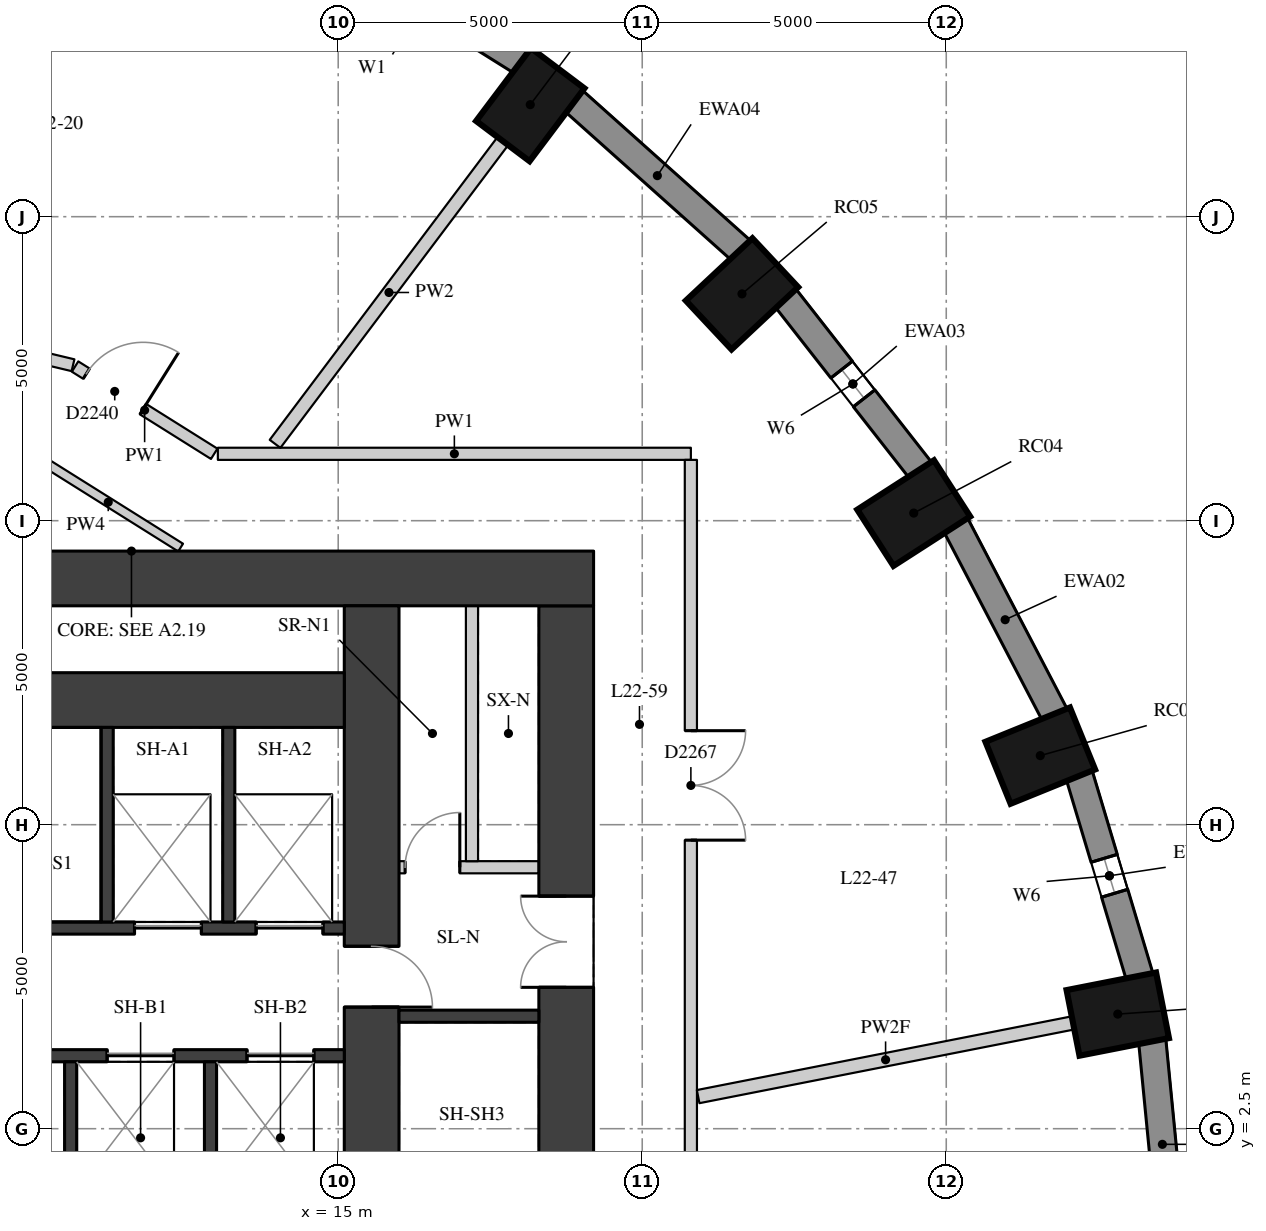
"""IFC4 building model, lengths in metres.
Left out: names, types, materials, properties, quantities, classifications, styles, units other than length and angle.
Written with IfcOpenShell. Run it as: python <this file> out.ifc"""

import sys

from ifc_helpers import new_model, si_unit, direction, frame, frame_2d, origin, origin_2d, place, context, subcontext, project, spatial, rectangle, extrude, element, fill, save


model = new_model("IFC4")
c1 = context("Model", 3, precision=1e-05, world=origin(), true_north=direction((0.0, 1.0)))
c2 = subcontext(c1, "Body", "Model", "MODEL_VIEW")
j1 = project(units=[si_unit("LENGTHUNIT", "METRE"), si_unit("PLANEANGLEUNIT", "RADIAN")], contexts=[c1])
p1 = place(None, origin())
s1 = spatial("IfcSite", under=j1, at=p1, CompositionType="ELEMENT")
p2 = place(p1, origin())
s2 = spatial("IfcBuilding", under=s1, at=p2, CompositionType="ELEMENT")
p3 = place(p2, frame((0.0, 0.0, 81.1)))
s3 = spatial("IfcBuildingStorey", under=s2, at=p3, CompositionType="ELEMENT", Elevation=81.1)
for number, where, z_axis, x_axis in (
    (1, (27.821, 4.385, 0.0), (0.0, 0.0, 1.0), (0.981, 0.193, 0.0)),
    (2, (26.546, 8.636, 0.0), (0.0, 0.0, 1.0), (0.927, 0.376, 0.0)),
    (3, (24.465, 12.625, 0.0), (0.0, 0.0, 1.0), (0.841, 0.541, 0.0)),
    (4, (21.641, 16.23, 0.0), (0.0, 0.0, 1.0), (0.73, 0.683, 0.0)),
    (5, (18.159, 19.343, 0.0), (0.0, 0.0, 1.0), (0.601, 0.799, 0.0)),
):
    element("IfcColumn", number, at=place(p3, frame(where, z_axis=z_axis, x_axis=x_axis)), inside=s3, PredefinedType="COLUMN", context=c2, shape_type="SweptSolid", body=[
        extrude(rectangle(XDim=1.5, YDim=1.1, at=origin_2d()), origin(), (0.0, 0.0, 1.0), 3.3),
    ])
p4 = place(p3, frame((28.722, 0.53, 0.0), z_axis=(0.0, 0.0, 1.0), x_axis=(-0.097389581596, 0.995246336038, 0.0)))
e6 = element("IfcWall", 6, at=p4, inside=s3, PredefinedType="SOLIDWALL", context=c2, shape_type="SweptSolid", body=[
    extrude(rectangle(XDim=3.442, YDim=0.45, at=frame_2d((1.721, 0.0))), origin(), (0.0, 0.0, 1.0), 2.85),
])
p5 = place(p3, frame((28.182, 4.996, 0.0), z_axis=(0.0, 0.0, 1.0), x_axis=(-0.287064133733, 0.957911364963, 0.0)))
e7 = element("IfcWall", 7, at=p5, inside=s3, PredefinedType="SOLIDWALL", context=c2, shape_type="SweptSolid", body=[
    extrude(rectangle(XDim=3.473, YDim=0.45, at=frame_2d((1.737, 0.0))), origin(), (0.0, 0.0, 1.0), 2.85),
])
p6 = place(p5, frame((1.437, 0.0, 0.4)))
e8 = element("IfcOpeningElement", 8, at=p6, cuts=e7, PredefinedType="OPENING", context=c2, shape_type="SweptSolid", body=[
    extrude(rectangle(XDim=0.6, YDim=1.75, at=frame_2d((0.3, 0.875))), frame((0.0, 0.235, 0.0), z_axis=(0.0, -1.0, 0.0), x_axis=(1.0, 0.0, 0.0)), (0.0, 0.0, 1.0), 0.47),
])
p7 = place(p3, frame((26.786, 9.305, 0.0), z_axis=(0.0, 0.0, 1.0), x_axis=(-0.462492775226, 0.886623050041, 0.0)))
e9 = element("IfcWall", 9, at=p7, inside=s3, PredefinedType="SOLIDWALL", context=c2, shape_type="SweptSolid", body=[
    extrude(rectangle(XDim=3.532, YDim=0.45, at=frame_2d((1.766, 0.0))), origin(), (0.0, 0.0, 1.0), 2.85),
])
p8 = place(p3, frame((24.578, 13.328, 0.0), z_axis=(0.0, 0.0, 1.0), x_axis=(-0.616661975264, 0.787228053529, 0.0)))
e10 = element("IfcWall", 10, at=p8, inside=s3, PredefinedType="SOLIDWALL", context=c2, shape_type="SweptSolid", body=[
    extrude(rectangle(XDim=3.61, YDim=0.45, at=frame_2d((1.805, 0.0))), origin(), (0.0, 0.0, 1.0), 2.85),
])
p9 = place(p8, frame((1.505, 0.0, 0.4)))
e11 = element("IfcOpeningElement", 11, at=p9, cuts=e10, PredefinedType="OPENING", context=c2, shape_type="SweptSolid", body=[
    extrude(rectangle(XDim=0.6, YDim=1.75, at=frame_2d((0.3, 0.875))), frame((0.0, 0.235, 0.0), z_axis=(0.0, -1.0, 0.0), x_axis=(1.0, 0.0, 0.0)), (0.0, 0.0, 1.0), 0.47),
])
p10 = place(p3, frame((21.627, 16.943, 0.0), z_axis=(0.0, 0.0, 1.0), x_axis=(-0.745526233716, 0.66647628228, 0.0)))
e12 = element("IfcWall", 12, at=p10, inside=s3, PredefinedType="SOLIDWALL", context=c2, shape_type="SweptSolid", body=[
    extrude(rectangle(XDim=3.697, YDim=0.45, at=frame_2d((1.848, 0.0))), origin(), (0.0, 0.0, 1.0), 2.85),
])
p11 = place(p3, frame((18.023, 20.044, 0.0), z_axis=(0.0, 0.0, 1.0), x_axis=(-0.847635480093, 0.530579016629, 0.0)))
e13 = element("IfcWall", 13, at=p11, inside=s3, PredefinedType="SOLIDWALL", context=c2, shape_type="SweptSolid", body=[
    extrude(rectangle(XDim=3.782, YDim=0.45, at=frame_2d((1.891, 0.0))), origin(), (0.0, 0.0, 1.0), 2.85),
])
p12 = place(p11, frame((0.791, 0.0, 0.4)))
e14 = element("IfcOpeningElement", 14, at=p12, cuts=e13, PredefinedType="OPENING", context=c2, shape_type="SweptSolid", body=[
    extrude(rectangle(XDim=2.2, YDim=1.75, at=frame_2d((1.1, 0.875))), frame((0.0, 0.235, 0.0), z_axis=(0.0, -1.0, 0.0), x_axis=(1.0, 0.0, 0.0)), (0.0, 0.0, 1.0), 0.47),
])
p13 = place(p3, frame((18.75, -11.1, 0.0), z_axis=(0.0, 0.0, 1.0), x_axis=(0.0, 1.0, 0.0)))
e15 = element("IfcWall", 15, at=p13, inside=s3, PredefinedType="SHEAR", context=c2, shape_type="SweptSolid", body=[
    extrude(rectangle(XDim=22.2, YDim=0.9, at=frame_2d((11.1, 0.0))), origin(), (0.0, 0.0, 1.0), 2.85),
])
p14 = place(p13, frame((15.925, 0.0, 0.0)))
e16 = element("IfcOpeningElement", 16, at=p14, cuts=e15, PredefinedType="OPENING", context=c2, shape_type="SweptSolid", body=[
    extrude(rectangle(XDim=1.5, YDim=2.1, at=frame_2d((0.75, 1.05))), frame((0.0, 0.46, 0.0), z_axis=(0.0, -1.0, 0.0), x_axis=(1.0, 0.0, 0.0)), (0.0, 0.0, 1.0), 0.92),
])
p15 = place(p13, frame((4.525, 0.0, 0.0)))
e17 = element("IfcOpeningElement", 17, at=p15, cuts=e15, PredefinedType="OPENING", context=c2, shape_type="SweptSolid", body=[
    extrude(rectangle(XDim=1.5, YDim=2.1, at=frame_2d((0.75, 1.05))), frame((0.0, 0.46, 0.0), z_axis=(0.0, -1.0, 0.0), x_axis=(1.0, 0.0, 0.0)), (0.0, 0.0, 1.0), 0.92),
])
p16 = place(p3, frame((4.0, 11.55, 0.0), z_axis=(0.0, 0.0, 1.0), x_axis=(1.0, 0.0, 0.0)))
e18 = element("IfcWall", 18, at=p16, inside=s3, PredefinedType="SHEAR", context=c2, shape_type="SweptSolid", body=[
    extrude(rectangle(XDim=15.2, YDim=0.9, at=frame_2d((7.6, 0.0))), origin(), (0.0, 0.0, 1.0), 2.85),
])
p17 = place(p3, frame((15.55, -11.1, 0.0), z_axis=(0.0, 0.0, 1.0), x_axis=(0.0, 1.0, 0.0)))
e19 = element("IfcWall", 19, at=p17, inside=s3, PredefinedType="SHEAR", context=c2, shape_type="SweptSolid", body=[
    extrude(rectangle(XDim=22.2, YDim=0.9, at=frame_2d((11.1, 0.0))), origin(), (0.0, 0.0, 1.0), 2.85),
])
p18 = place(p17, frame((15.6, 0.0, 0.0)))
e20 = element("IfcOpeningElement", 20, at=p18, cuts=e19, PredefinedType="OPENING", context=c2, shape_type="SweptSolid", body=[
    extrude(rectangle(XDim=1.0, YDim=2.1, at=frame_2d((0.5, 1.05))), frame((0.0, 0.46, 0.0), z_axis=(0.0, -1.0, 0.0), x_axis=(1.0, 0.0, 0.0)), (0.0, 0.0, 1.0), 0.92),
])
p19 = place(p17, frame((5.6, 0.0, 0.0)))
e21 = element("IfcOpeningElement", 21, at=p19, cuts=e19, PredefinedType="OPENING", context=c2, shape_type="SweptSolid", body=[
    extrude(rectangle(XDim=1.0, YDim=2.1, at=frame_2d((0.5, 1.05))), frame((0.0, 0.46, 0.0), z_axis=(0.0, -1.0, 0.0), x_axis=(1.0, 0.0, 0.0)), (0.0, 0.0, 1.0), 0.92),
])
p20 = place(p3, frame((4.9, 9.55, 0.0), z_axis=(0.0, 0.0, 1.0), x_axis=(1.0, 0.0, 0.0)))
e22 = element("IfcWall", 22, at=p20, inside=s3, PredefinedType="SHEAR", context=c2, shape_type="SweptSolid", body=[
    extrude(rectangle(XDim=10.2, YDim=0.9, at=frame_2d((5.1, 0.0))), origin(), (0.0, 0.0, 1.0), 2.85),
])
p21 = place(p3, frame((4.9, 5.8, 0.0), z_axis=(0.0, 0.0, 1.0), x_axis=(1.0, 0.0, 0.0)))
e23 = element("IfcWall", 23, at=p21, inside=s3, PredefinedType="SHEAR", context=c2, shape_type="SweptSolid", body=[
    extrude(rectangle(XDim=10.2, YDim=0.2, at=frame_2d((5.1, 0.0))), origin(), (0.0, 0.0, 1.0), 2.85),
])
p22 = place(p21, frame((6.75, 0.0, 0.0)))
e24 = element("IfcOpeningElement", 24, at=p22, cuts=e23, PredefinedType="OPENING", context=c2, shape_type="SweptSolid", body=[
    extrude(rectangle(XDim=1.1, YDim=2.1, at=frame_2d((0.55, 1.05))), frame((0.0, 0.11, 0.0), z_axis=(0.0, -1.0, 0.0), x_axis=(1.0, 0.0, 0.0)), (0.0, 0.0, 1.0), 0.22),
])
p23 = place(p21, frame((8.75, 0.0, 0.0)))
e25 = element("IfcOpeningElement", 25, at=p23, cuts=e23, PredefinedType="OPENING", context=c2, shape_type="SweptSolid", body=[
    extrude(rectangle(XDim=1.1, YDim=2.1, at=frame_2d((0.55, 1.05))), frame((0.0, 0.11, 0.0), z_axis=(0.0, -1.0, 0.0), x_axis=(1.0, 0.0, 0.0)), (0.0, 0.0, 1.0), 0.22),
])
p24 = place(p3, frame((4.9, 3.7, 0.0), z_axis=(0.0, 0.0, 1.0), x_axis=(1.0, 0.0, 0.0)))
e26 = element("IfcWall", 26, at=p24, inside=s3, PredefinedType="SHEAR", context=c2, shape_type="SweptSolid", body=[
    extrude(rectangle(XDim=10.2, YDim=0.2, at=frame_2d((5.1, 0.0))), origin(), (0.0, 0.0, 1.0), 2.85),
])
p25 = place(p24, frame((6.3, 0.0, 0.0)))
e27 = element("IfcOpeningElement", 27, at=p25, cuts=e26, PredefinedType="OPENING", context=c2, shape_type="SweptSolid", body=[
    extrude(rectangle(XDim=1.1, YDim=2.1, at=frame_2d((0.55, 1.05))), frame((0.0, 0.11, 0.0), z_axis=(0.0, -1.0, 0.0), x_axis=(1.0, 0.0, 0.0)), (0.0, 0.0, 1.0), 0.22),
])
p26 = place(p24, frame((8.6, 0.0, 0.0)))
e28 = element("IfcOpeningElement", 28, at=p26, cuts=e26, PredefinedType="OPENING", context=c2, shape_type="SweptSolid", body=[
    extrude(rectangle(XDim=1.1, YDim=2.1, at=frame_2d((0.55, 1.05))), frame((0.0, 0.11, 0.0), z_axis=(0.0, -1.0, 0.0), x_axis=(1.0, 0.0, 0.0)), (0.0, 0.0, 1.0), 0.22),
])
for number, where, z_axis, x_axis in (
    (29, (11.2, 5.9, 0.0), (0.0, 0.0, 1.0), (0.0, 1.0, 0.0)),
    (30, (13.2, 5.9, 0.0), (0.0, 0.0, 1.0), (0.0, 1.0, 0.0)),
):
    element("IfcWall", number, at=place(p3, frame(where, z_axis=z_axis, x_axis=x_axis)), inside=s3, PredefinedType="SHEAR", context=c2, shape_type="SweptSolid", body=[
        extrude(rectangle(XDim=3.2, YDim=0.2, at=frame_2d((1.6, 0.0))), origin(), (0.0, 0.0, 1.0), 2.85),
    ])
for number, where, z_axis, x_axis in (
    (31, (10.6, 1.1, 0.0), (0.0, 0.0, 1.0), (0.0, 1.0, 0.0)),
    (32, (12.9, 1.1, 0.0), (0.0, 0.0, 1.0), (0.0, 1.0, 0.0)),
):
    element("IfcWall", number, at=place(p3, frame(where, z_axis=z_axis, x_axis=x_axis)), inside=s3, PredefinedType="SHEAR", context=c2, shape_type="SweptSolid", body=[
        extrude(rectangle(XDim=2.5, YDim=0.2, at=frame_2d((1.25, 0.0))), origin(), (0.0, 0.0, 1.0), 2.85),
    ])
p27 = place(p3, frame((16.0, 4.35, 0.0), z_axis=(0.0, 0.0, 1.0), x_axis=(1.0, 0.0, 0.0)))
e33 = element("IfcWall", 33, at=p27, inside=s3, PredefinedType="SHEAR", context=c2, shape_type="SweptSolid", body=[
    extrude(rectangle(XDim=2.3, YDim=0.2, at=frame_2d((1.15, 0.0))), origin(), (0.0, 0.0, 1.0), 2.85),
])
p28 = place(p3, frame((16.0, 6.8, 0.0), z_axis=(0.0, 0.0, 1.0), x_axis=(1.0, 0.0, 0.0)))
e34 = element("IfcWall", 34, at=p28, inside=s3, PredefinedType="PARTITIONING", context=c2, shape_type="SweptSolid", body=[
    extrude(rectangle(XDim=2.3, YDim=0.2, at=frame_2d((1.15, 0.0))), origin(), (0.0, 0.0, 1.0), 2.85),
])
p29 = place(p28, frame((0.1, 0.0, 0.0)))
e35 = element("IfcOpeningElement", 35, at=p29, cuts=e34, PredefinedType="OPENING", context=c2, shape_type="SweptSolid", body=[
    extrude(rectangle(XDim=0.9, YDim=2.1, at=frame_2d((0.45, 1.05))), frame((0.0, 0.11, 0.0), z_axis=(0.0, -1.0, 0.0), x_axis=(1.0, 0.0, 0.0)), (0.0, 0.0, 1.0), 0.22),
])
p30 = place(p3, frame((17.2, 6.9, 0.0), z_axis=(0.0, 0.0, 1.0), x_axis=(0.0, 1.0, 0.0)))
e36 = element("IfcWall", 36, at=p30, inside=s3, PredefinedType="PARTITIONING", context=c2, shape_type="SweptSolid", body=[
    extrude(rectangle(XDim=4.2, YDim=0.2, at=frame_2d((2.1, 0.0))), origin(), (0.0, 0.0, 1.0), 2.85),
])
p31 = place(p3, frame((0.098, 17.577, 0.0), z_axis=(0.0, 0.0, 1.0), x_axis=(0.97259262522, -0.232515774447, 0.0)))
e37 = element("IfcWall", 37, at=p31, inside=s3, PredefinedType="PARTITIONING", context=c2, shape_type="SweptSolid", body=[
    extrude(rectangle(XDim=10.838, YDim=0.2, at=frame_2d((5.419, 0.0))), origin(), (0.0, 0.0, 1.0), 2.85),
])
p32 = place(p31, frame((1.905, 0.0, 0.0)))
e38 = element("IfcOpeningElement", 38, at=p32, cuts=e37, PredefinedType="OPENING", context=c2, shape_type="SweptSolid", body=[
    extrude(rectangle(XDim=1.0, YDim=2.1, at=frame_2d((0.5, 1.05))), frame((0.0, 0.11, 0.0), z_axis=(0.0, -1.0, 0.0), x_axis=(1.0, 0.0, 0.0)), (0.0, 0.0, 1.0), 0.22),
])
p33 = place(p3, frame((10.672, 15.035, 0.0), z_axis=(0.0, 0.0, 1.0), x_axis=(0.847149253931, -0.531355005213, 0.0)))
e39 = element("IfcWall", 39, at=p33, inside=s3, PredefinedType="PARTITIONING", context=c2, shape_type="SweptSolid", body=[
    extrude(rectangle(XDim=2.701, YDim=0.2, at=frame_2d((1.351, 0.0))), origin(), (0.0, 0.0, 1.0), 2.85),
])
p34 = place(p33, frame((0.22, 0.0, 0.0)))
e40 = element("IfcOpeningElement", 40, at=p34, cuts=e39, PredefinedType="OPENING", context=c2, shape_type="SweptSolid", body=[
    extrude(rectangle(XDim=1.1, YDim=2.1, at=frame_2d((0.55, 1.05))), frame((0.0, 0.11, 0.0), z_axis=(0.0, -1.0, 0.0), x_axis=(1.0, 0.0, 0.0)), (0.0, 0.0, 1.0), 0.22),
])
p35 = place(p3, frame((13.021, 13.6, 0.0), z_axis=(0.0, 0.0, 1.0), x_axis=(1.0, 0.0, 0.0)))
e41 = element("IfcWall", 41, at=p35, inside=s3, PredefinedType="PARTITIONING", context=c2, shape_type="SweptSolid", body=[
    extrude(rectangle(XDim=7.779, YDim=0.2, at=frame_2d((3.89, 0.0))), origin(), (0.0, 0.0, 1.0), 2.85),
])
p36 = place(p3, frame((20.8, 13.5, 0.0), z_axis=(0.0, 0.0, 1.0), x_axis=(0.0, -1.0, 0.0)))
e42 = element("IfcWall", 42, at=p36, inside=s3, PredefinedType="PARTITIONING", context=c2, shape_type="SweptSolid", body=[
    extrude(rectangle(XDim=27.1, YDim=0.2, at=frame_2d((13.55, 0.0))), origin(), (0.0, 0.0, 1.0), 2.85),
])
p37 = place(p36, frame((14.149, 0.0, 0.0)))
e43 = element("IfcOpeningElement", 43, at=p37, cuts=e42, PredefinedType="OPENING", context=c2, shape_type="SweptSolid", body=[
    extrude(rectangle(XDim=1.8, YDim=2.1, at=frame_2d((0.9, 1.05))), frame((0.0, 0.11, 0.0), z_axis=(0.0, -1.0, 0.0), x_axis=(1.0, 0.0, 0.0)), (0.0, 0.0, 1.0), 0.22),
])
p38 = place(p36, frame((4.454, 0.0, 0.0)))
e44 = element("IfcOpeningElement", 44, at=p38, cuts=e42, PredefinedType="OPENING", context=c2, shape_type="SweptSolid", body=[
    extrude(rectangle(XDim=1.8, YDim=2.1, at=frame_2d((0.9, 1.05))), frame((0.0, 0.11, 0.0), z_axis=(0.0, -1.0, 0.0), x_axis=(1.0, 0.0, 0.0)), (0.0, 0.0, 1.0), 0.22),
])
p39 = place(p3, frame((10.028, 13.551, 0.0), z_axis=(0.0, 0.0, 1.0), x_axis=(0.847128314977, -0.531388387118, 0.0)))
e45 = element("IfcWall", 45, at=p39, inside=s3, PredefinedType="PARTITIONING", context=c2, shape_type="SweptSolid", body=[
    extrude(rectangle(XDim=2.81, YDim=0.15, at=frame_2d((1.405, 0.0))), origin(), (0.0, 0.0, 1.0), 2.85),
])
p40 = place(p3, frame((27.085, 4.24, 0.0), z_axis=(0.0, 0.0, 1.0), x_axis=(-0.981207724218, -0.192954403772, 0.0)))
e46 = element("IfcWall", 46, at=p40, inside=s3, PredefinedType="PARTITIONING", context=c2, shape_type="SweptSolid", body=[
    extrude(rectangle(XDim=6.283, YDim=0.22, at=frame_2d((3.142, 0.0))), origin(), (0.0, 0.0, 1.0), 2.3),
])
p41 = place(p3, frame((17.708, 18.743, 0.0), z_axis=(0.0, 0.0, 1.0), x_axis=(-0.601177883261, -0.799115231164, 0.0)))
e47 = element("IfcWall", 47, at=p41, inside=s3, PredefinedType="PARTITIONING", context=c2, shape_type="SweptSolid", body=[
    extrude(rectangle(XDim=6.231, YDim=0.22, at=frame_2d((3.116, 0.0))), origin(), (0.0, 0.0, 1.0), 2.85),
])
p42 = place(p6, origin())
e48 = element("IfcWindow", 48, at=p42, inside=s3, PartitioningType="SINGLE_PANEL", PredefinedType="WINDOW", context=c2, shape_type="SweptSolid", body=[
    extrude(rectangle(XDim=0.6, YDim=1.75, at=frame_2d((0.3, 0.875))), frame((0.0, 0.035, 0.0), z_axis=(0.0, -1.0, 0.0), x_axis=(1.0, 0.0, 0.0)), (0.0, 0.0, 1.0), 0.06),
])
fill(e8, e48)
p43 = place(p9, origin())
e49 = element("IfcWindow", 49, at=p43, inside=s3, PartitioningType="SINGLE_PANEL", PredefinedType="WINDOW", context=c2, shape_type="SweptSolid", body=[
    extrude(rectangle(XDim=0.6, YDim=1.75, at=frame_2d((0.3, 0.875))), frame((0.0, 0.035, 0.0), z_axis=(0.0, -1.0, 0.0), x_axis=(1.0, 0.0, 0.0)), (0.0, 0.0, 1.0), 0.06),
])
fill(e11, e49)
p44 = place(p14, origin())
e50 = element("IfcDoor", 50, at=p44, inside=s3, OperationType="DOUBLE_DOOR_SINGLE_SWING", PredefinedType="DOOR", context=c2, shape_type="SweptSolid", body=[
    extrude(rectangle(XDim=1.5, YDim=2.1, at=frame_2d((0.75, 1.05))), frame((0.0, 0.025, 0.0), z_axis=(0.0, -1.0, 0.0), x_axis=(1.0, 0.0, 0.0)), (0.0, 0.0, 1.0), 0.05),
])
fill(e16, e50)
p45 = place(p22, origin())
e51 = element("IfcDoor", 51, at=p45, inside=s3, OperationType="DOUBLE_DOOR_SLIDING", PredefinedType="DOOR", context=c2, shape_type="SweptSolid", body=[
    extrude(rectangle(XDim=1.1, YDim=2.1, at=frame_2d((0.55, 1.05))), frame((0.0, 0.025, 0.0), z_axis=(0.0, -1.0, 0.0), x_axis=(1.0, 0.0, 0.0)), (0.0, 0.0, 1.0), 0.05),
])
fill(e24, e51)
p46 = place(p23, origin())
e52 = element("IfcDoor", 52, at=p46, inside=s3, OperationType="DOUBLE_DOOR_SLIDING", PredefinedType="DOOR", context=c2, shape_type="SweptSolid", body=[
    extrude(rectangle(XDim=1.1, YDim=2.1, at=frame_2d((0.55, 1.05))), frame((0.0, 0.025, 0.0), z_axis=(0.0, -1.0, 0.0), x_axis=(1.0, 0.0, 0.0)), (0.0, 0.0, 1.0), 0.05),
])
fill(e25, e52)
p47 = place(p25, origin())
e53 = element("IfcDoor", 53, at=p47, inside=s3, OperationType="DOUBLE_DOOR_SLIDING", PredefinedType="DOOR", context=c2, shape_type="SweptSolid", body=[
    extrude(rectangle(XDim=1.1, YDim=2.1, at=frame_2d((0.55, 1.05))), frame((0.0, 0.025, 0.0), z_axis=(0.0, -1.0, 0.0), x_axis=(1.0, 0.0, 0.0)), (0.0, 0.0, 1.0), 0.05),
])
fill(e27, e53)
p48 = place(p26, origin())
e54 = element("IfcDoor", 54, at=p48, inside=s3, OperationType="DOUBLE_DOOR_SLIDING", PredefinedType="DOOR", context=c2, shape_type="SweptSolid", body=[
    extrude(rectangle(XDim=1.1, YDim=2.1, at=frame_2d((0.55, 1.05))), frame((0.0, 0.025, 0.0), z_axis=(0.0, -1.0, 0.0), x_axis=(1.0, 0.0, 0.0)), (0.0, 0.0, 1.0), 0.05),
])
fill(e28, e54)
p49 = place(p18, origin())
e55 = element("IfcDoor", 55, at=p49, inside=s3, OperationType="SINGLE_SWING_RIGHT", PredefinedType="DOOR", context=c2, shape_type="SweptSolid", body=[
    extrude(rectangle(XDim=1.0, YDim=2.1, at=frame_2d((0.5, 1.05))), frame((0.0, 0.025, 0.0), z_axis=(0.0, -1.0, 0.0), x_axis=(1.0, 0.0, 0.0)), (0.0, 0.0, 1.0), 0.05),
])
fill(e20, e55)
p50 = place(p29, origin())
e56 = element("IfcDoor", 56, at=p50, inside=s3, OperationType="SINGLE_SWING_RIGHT", PredefinedType="DOOR", context=c2, shape_type="SweptSolid", body=[
    extrude(rectangle(XDim=0.9, YDim=2.1, at=frame_2d((0.45, 1.05))), frame((0.0, 0.025, 0.0), z_axis=(0.0, -1.0, 0.0), x_axis=(1.0, 0.0, 0.0)), (0.0, 0.0, 1.0), 0.05),
])
fill(e35, e56)
p51 = place(p34, origin())
e57 = element("IfcDoor", 57, at=p51, inside=s3, OperationType="SINGLE_SWING_RIGHT", PredefinedType="DOOR", context=c2, shape_type="SweptSolid", body=[
    extrude(rectangle(XDim=1.1, YDim=2.1, at=frame_2d((0.55, 1.05))), frame((0.0, 0.025, 0.0), z_axis=(0.0, -1.0, 0.0), x_axis=(1.0, 0.0, 0.0)), (0.0, 0.0, 1.0), 0.05),
])
fill(e40, e57)
p52 = place(p38, origin())
e58 = element("IfcDoor", 58, at=p52, inside=s3, OperationType="DOUBLE_DOOR_SINGLE_SWING", PredefinedType="DOOR", context=c2, shape_type="SweptSolid", body=[
    extrude(rectangle(XDim=1.8, YDim=2.1, at=frame_2d((0.9, 1.05))), frame((0.0, 0.025, 0.0), z_axis=(0.0, -1.0, 0.0), x_axis=(1.0, 0.0, 0.0)), (0.0, 0.0, 1.0), 0.05),
])
fill(e44, e58)
save(model, sys.argv[1])
